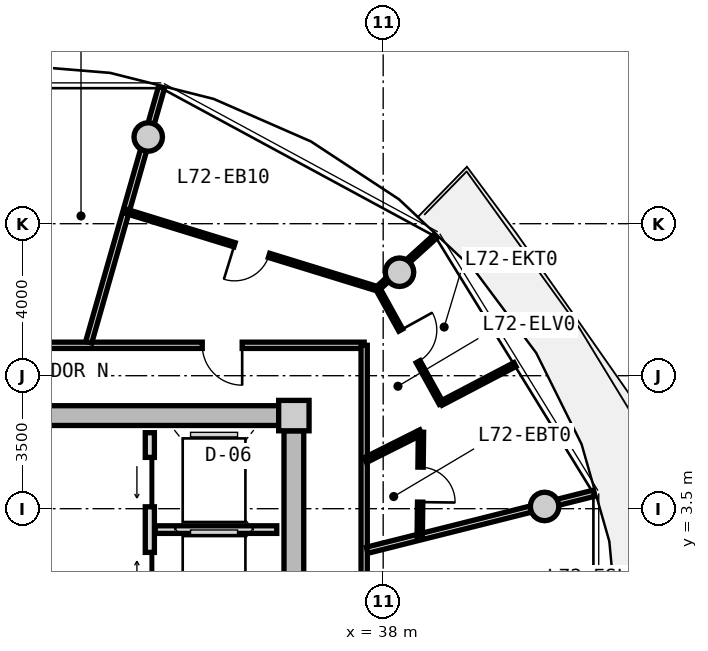
"""IFC4 building model, lengths in metres.
Left out: names, types, materials, properties, quantities, classifications, styles, units other than length and angle.
Written with IfcOpenShell. Run it as: python <this file> out.ifc"""

import sys

from ifc_helpers import new_model, si_unit, direction, frame, frame_2d, origin, origin_2d, place, context, subcontext, project, spatial, rectangle, circle, extrude, source, transform, mapped, element, fill, save


model = new_model("IFC4")
c1 = context("Model", 3, precision=1e-05, world=origin(), true_north=direction((0.0, 1.0)))
c2 = subcontext(c1, "Body", "Model", "MODEL_VIEW")
j1 = project(units=[si_unit("LENGTHUNIT", "METRE"), si_unit("PLANEANGLEUNIT", "RADIAN")], contexts=[c1])
p1 = place(None, origin())
s1 = spatial("IfcSite", under=j1, at=p1, CompositionType="ELEMENT")
p2 = place(p1, origin())
s2 = spatial("IfcBuilding", under=s1, at=p2, CompositionType="ELEMENT")
p3 = place(p2, frame((0.0, 0.0, 232.2)))
s3 = spatial("IfcBuildingStorey", under=s2, at=p3, CompositionType="ELEMENT", Elevation=232.2)
m1 = source(origin(), c2, "Body", "SweptSolid", [
    extrude(rectangle(XDim=0.8, YDim=0.8, at=origin_2d()), origin(), (0.0, 0.0, 1.0), 3.05),
])
p4 = place(p3, frame((35.65, 5.95, 0.0), z_axis=(0.0, 0.0, 1.0), x_axis=(1.0, 0.0, 0.0)))
e1 = element("IfcColumn", 1, at=p4, inside=s3, PredefinedType="COLUMN", context=c2, shape_type="MappedRepresentation", body=[
    mapped(m1, transform((0.0, 0.0, 0.0), x_axis=(1.0, 0.0, 0.0), y_axis=(0.0, 1.0, 0.0), z_axis=(0.0, 0.0, 1.0), scale=1.0)),
])
m2 = source(origin(), c2, "Body", "SweptSolid", [
    extrude(rectangle(XDim=14.5, YDim=0.52, at=frame_2d((7.25, 0.0))), origin(), (0.0, 0.0, 1.0), 2.81),
])
p5 = place(p3, frame((20.75, 5.95, 0.0), z_axis=(0.0, 0.0, 1.0), x_axis=(1.0, 0.0, 0.0)))
e2 = element("IfcWall", 2, at=p5, inside=s3, PredefinedType="SHEAR", context=c2, shape_type="MappedRepresentation", body=[
    mapped(m2, transform((0.0, 0.0, 0.0), x_axis=(1.0, 0.0, 0.0), y_axis=(0.0, 1.0, 0.0), z_axis=(0.0, 0.0, 1.0), scale=1.0)),
])
m3 = source(origin(), c2, "Body", "SweptSolid", [
    extrude(rectangle(XDim=11.1, YDim=0.52, at=frame_2d((5.55, 0.0))), origin(), (0.0, 0.0, 1.0), 2.81),
])
p6 = place(p3, frame((35.65, 5.55, 0.0), z_axis=(0.0, 0.0, 1.0), x_axis=(0.0, -1.0, 0.0)))
e3 = element("IfcWall", 3, at=p6, inside=s3, PredefinedType="SHEAR", context=c2, shape_type="MappedRepresentation", body=[
    mapped(m3, transform((0.0, 0.0, 0.0), x_axis=(1.0, 0.0, 0.0), y_axis=(0.0, 1.0, 0.0), z_axis=(0.0, 0.0, 1.0), scale=1.0)),
])
p7 = place(p6, frame((5.65, 0.0, 0.0)))
e4 = element("IfcOpeningElement", 4, at=p7, cuts=e3, PredefinedType="OPENING", context=c2, shape_type="SweptSolid", body=[
    extrude(rectangle(XDim=1.2, YDim=2.15, at=frame_2d((0.6, 1.075))), frame((0.0, 0.27, 0.0), z_axis=(0.0, -1.0, 0.0), x_axis=(1.0, 0.0, 0.0)), (0.0, 0.0, 1.0), 0.54),
])
m4 = source(origin(), c2, "Body", "SweptSolid", [
    extrude(circle(Radius=0.375, at=origin_2d()), origin(), (0.0, 0.0, 1.0), 3.05),
])
for number, where, z_axis, x_axis in (
    (5, (42.247, 3.559, 0.0), (0.0, 0.0, 1.0), (1.0, 0.0, 0.0)),
    (6, (38.43, 9.723, 0.0), (0.0, 0.0, 1.0), (1.0, 0.0, 0.0)),
    (7, (31.818, 13.281, 0.0), (0.0, 0.0, 1.0), (1.0, 0.0, 0.0)),
):
    element("IfcColumn", number, at=place(p3, frame(where, z_axis=z_axis, x_axis=x_axis)), inside=s3, PredefinedType="COLUMN", context=c2, shape_type="MappedRepresentation", body=[
        mapped(m4, transform((0.0, 0.0, 0.0), x_axis=(1.0, 0.0, 0.0), y_axis=(0.0, 1.0, 0.0), z_axis=(0.0, 0.0, 1.0), scale=1.0)),
    ])
m5 = source(origin(), c2, "Body", "SweptSolid", [
    extrude(rectangle(XDim=5.0, YDim=0.24, at=frame_2d((2.5, 0.0))), origin(), (0.0, 0.0, 1.0), 2.795),
])
p8 = place(p3, frame((31.86, 0.5, 0.0), z_axis=(0.0, 0.0, 1.0), x_axis=(0.0, 1.0, 0.0)))
e8 = element("IfcWall", 8, at=p8, inside=s3, PredefinedType="PARTITIONING", context=c2, shape_type="MappedRepresentation", body=[
    mapped(m5, transform((0.0, 0.0, 0.0), x_axis=(1.0, 0.0, 0.0), y_axis=(0.0, 1.0, 0.0), z_axis=(0.0, 0.0, 1.0), scale=1.0)),
])
p9 = place(p8, frame((3.05, 0.0, 0.0)))
e9 = element("IfcOpeningElement", 9, at=p9, cuts=e8, PredefinedType="OPENING", context=c2, shape_type="SweptSolid", body=[
    extrude(rectangle(XDim=1.3, YDim=2.2, at=frame_2d((0.65, 1.1))), frame((0.0, 0.13, 0.0), z_axis=(0.0, -1.0, 0.0), x_axis=(1.0, 0.0, 0.0)), (0.0, 0.0, 1.0), 0.26),
])
p10 = place(p8, frame((0.55, 0.0, 0.0)))
e10 = element("IfcOpeningElement", 10, at=p10, cuts=e8, PredefinedType="OPENING", context=c2, shape_type="SweptSolid", body=[
    extrude(rectangle(XDim=1.3, YDim=2.2, at=frame_2d((0.65, 1.1))), frame((0.0, 0.13, 0.0), z_axis=(0.0, -1.0, 0.0), x_axis=(1.0, 0.0, 0.0)), (0.0, 0.0, 1.0), 0.26),
])
m6 = source(origin(), c2, "Body", "SweptSolid", [
    extrude(rectangle(XDim=3.2, YDim=0.2, at=frame_2d((1.6, 0.0))), origin(), (0.0, 0.0, 1.0), 2.795),
])
p11 = place(p3, frame((32.0, 2.95, 0.0), z_axis=(0.0, 0.0, 1.0), x_axis=(1.0, 0.0, 0.0)))
e11 = element("IfcWall", 11, at=p11, inside=s3, PredefinedType="PARTITIONING", context=c2, shape_type="MappedRepresentation", body=[
    mapped(m6, transform((0.0, 0.0, 0.0), x_axis=(1.0, 0.0, 0.0), y_axis=(0.0, 1.0, 0.0), z_axis=(0.0, 0.0, 1.0), scale=1.0)),
])
m7 = source(origin(), c2, "Body", "SweptSolid", [
    extrude(rectangle(XDim=8.58, YDim=0.165, at=frame_2d((4.29, 0.0))), origin(), (0.0, 0.0, 1.0), 2.795),
])
p12 = place(p3, frame((28.92, 7.8, 0.0), z_axis=(0.0, 0.0, 1.0), x_axis=(1.0, 0.0, 0.0)))
e12 = element("IfcWall", 12, at=p12, inside=s3, PredefinedType="PARTITIONING", context=c2, shape_type="MappedRepresentation", body=[
    mapped(m7, transform((0.0, 0.0, 0.0), x_axis=(1.0, 0.0, 0.0), y_axis=(0.0, 1.0, 0.0), z_axis=(0.0, 0.0, 1.0), scale=1.0)),
])
p13 = place(p12, frame((4.32, 0.0, 0.0)))
e13 = element("IfcOpeningElement", 13, at=p13, cuts=e12, PredefinedType="OPENING", context=c2, shape_type="SweptSolid", body=[
    extrude(rectangle(XDim=1.05, YDim=2.15, at=frame_2d((0.525, 1.075))), frame((0.0, 0.093, 0.0), z_axis=(0.0, -1.0, 0.0), x_axis=(1.0, 0.0, 0.0)), (0.0, 0.0, 1.0), 0.185),
])
m8 = source(origin(), c2, "Body", "SweptSolid", [
    extrude(rectangle(XDim=6.88, YDim=0.165, at=frame_2d((3.44, 0.0))), origin(), (0.0, 0.0, 1.0), 2.795),
])
p14 = place(p3, frame((37.5, 7.8, 0.0), z_axis=(0.0, 0.0, 1.0), x_axis=(0.0, -1.0, 0.0)))
e14 = element("IfcWall", 14, at=p14, inside=s3, PredefinedType="PARTITIONING", context=c2, shape_type="MappedRepresentation", body=[
    mapped(m8, transform((0.0, 0.0, 0.0), x_axis=(1.0, 0.0, 0.0), y_axis=(0.0, 1.0, 0.0), z_axis=(0.0, 0.0, 1.0), scale=1.0)),
])
m9 = source(origin(), c2, "Body", "SweptSolid", [
    extrude(rectangle(XDim=6.974, YDim=0.165, at=frame_2d((3.487, 0.0))), origin(), (0.0, 0.0, 1.0), 2.395),
])
p15 = place(p3, frame((30.251, 7.88, 0.0), z_axis=(0.0, 0.0, 1.0), x_axis=(0.274707256801, 0.961527910703, 0.0)))
e15 = element("IfcWall", 15, at=p15, inside=s3, PredefinedType="PARTITIONING", context=c2, shape_type="MappedRepresentation", body=[
    mapped(m9, transform((0.0, 0.0, 0.0), x_axis=(1.0, 0.0, 0.0), y_axis=(0.0, 1.0, 0.0), z_axis=(0.0, 0.0, 1.0), scale=1.0)),
])
m10 = source(origin(), c2, "Body", "SweptSolid", [
    extrude(rectangle(XDim=6.157, YDim=0.165, at=frame_2d((3.079, 0.0))), origin(), (0.0, 0.0, 1.0), 2.395),
])
p16 = place(p3, frame((37.58, 2.407, 0.0), z_axis=(0.0, 0.0, 1.0), x_axis=(0.969840867184, 0.243738984038, 0.0)))
e16 = element("IfcWall", 16, at=p16, inside=s3, PredefinedType="PARTITIONING", context=c2, shape_type="MappedRepresentation", body=[
    mapped(m10, transform((0.0, 0.0, 0.0), x_axis=(1.0, 0.0, 0.0), y_axis=(0.0, 1.0, 0.0), z_axis=(0.0, 0.0, 1.0), scale=1.0)),
])
m11 = source(origin(), c2, "Body", "SweptSolid", [
    extrude(rectangle(XDim=6.919, YDim=0.115, at=frame_2d((3.459, 0.0))), origin(), (0.0, 0.0, 1.0), 2.795),
])
p17 = place(p3, frame((37.849, 9.287, 0.0), z_axis=(0.0, 0.0, 1.0), x_axis=(-0.955678249072, 0.294413118341, 0.0)))
e17 = element("IfcWall", 17, at=p17, inside=s3, PredefinedType="PARTITIONING", context=c2, shape_type="MappedRepresentation", body=[
    mapped(m11, transform((0.0, 0.0, 0.0), x_axis=(1.0, 0.0, 0.0), y_axis=(0.0, 1.0, 0.0), z_axis=(0.0, 0.0, 1.0), scale=1.0)),
])
p18 = place(p17, frame((2.985, 0.0, 0.0)))
e18 = element("IfcOpeningElement", 18, at=p18, cuts=e17, PredefinedType="OPENING", context=c2, shape_type="SweptSolid", body=[
    extrude(rectangle(XDim=0.95, YDim=2.1, at=frame_2d((0.475, 1.05))), frame((0.0, 0.067, 0.0), z_axis=(0.0, -1.0, 0.0), x_axis=(1.0, 0.0, 0.0)), (0.0, 0.0, 1.0), 0.135),
])
m12 = source(origin(), c2, "Body", "SweptSolid", [
    extrude(rectangle(XDim=2.072, YDim=0.115, at=frame_2d((1.036, 0.0))), origin(), (0.0, 0.0, 1.0), 2.395),
])
p19 = place(p3, frame((37.849, 9.287, 0.0), z_axis=(0.0, 0.0, 1.0), x_axis=(0.741410125356, 0.671052178314, 0.0)))
e19 = element("IfcWall", 19, at=p19, inside=s3, PredefinedType="PARTITIONING", context=c2, shape_type="MappedRepresentation", body=[
    mapped(m12, transform((0.0, 0.0, 0.0), x_axis=(1.0, 0.0, 0.0), y_axis=(0.0, 1.0, 0.0), z_axis=(0.0, 0.0, 1.0), scale=1.0)),
])
m13 = source(origin(), c2, "Body", "SweptSolid", [
    extrude(rectangle(XDim=1.638, YDim=0.14, at=frame_2d((0.819, 0.0))), origin(), (0.0, 0.0, 1.0), 2.795),
])
p20 = place(p3, frame((37.53, 4.778, 0.0), z_axis=(0.0, 0.0, 1.0), x_axis=(0.893919977945, 0.448226586707, 0.0)))
e20 = element("IfcWall", 20, at=p20, inside=s3, PredefinedType="PARTITIONING", context=c2, shape_type="MappedRepresentation", body=[
    mapped(m13, transform((0.0, 0.0, 0.0), x_axis=(1.0, 0.0, 0.0), y_axis=(0.0, 1.0, 0.0), z_axis=(0.0, 0.0, 1.0), scale=1.0)),
])
m14 = source(origin(), c2, "Body", "SweptSolid", [
    extrude(rectangle(XDim=2.759, YDim=0.14, at=frame_2d((1.379, 0.0))), origin(), (0.0, 0.0, 1.0), 2.795),
])
p21 = place(p3, frame((38.995, 5.513, 0.0), z_axis=(0.0, 0.0, 1.0), x_axis=(-0.01194710728, -0.999928630767, 0.0)))
e21 = element("IfcWall", 21, at=p21, inside=s3, PredefinedType="PARTITIONING", context=c2, shape_type="MappedRepresentation", body=[
    mapped(m14, transform((0.0, 0.0, 0.0), x_axis=(1.0, 0.0, 0.0), y_axis=(0.0, 1.0, 0.0), z_axis=(0.0, 0.0, 1.0), scale=1.0)),
])
p22 = place(p21, frame((0.919, 0.0, 0.0)))
e22 = element("IfcOpeningElement", 22, at=p22, cuts=e21, PredefinedType="OPENING", context=c2, shape_type="SweptSolid", body=[
    extrude(rectangle(XDim=0.92, YDim=2.1, at=frame_2d((0.46, 1.05))), frame((0.0, 0.08, 0.0), z_axis=(0.0, -1.0, 0.0), x_axis=(1.0, 0.0, 0.0)), (0.0, 0.0, 1.0), 0.16),
])
m15 = source(origin(), c2, "Body", "SweptSolid", [
    extrude(rectangle(XDim=2.193, YDim=0.115, at=frame_2d((1.097, 0.0))), origin(), (0.0, 0.0, 1.0), 2.795),
])
p23 = place(p3, frame((39.525, 6.275, 0.0), z_axis=(0.0, 0.0, 1.0), x_axis=(0.885783595046, 0.464098505435, 0.0)))
e23 = element("IfcWall", 23, at=p23, inside=s3, PredefinedType="PARTITIONING", context=c2, shape_type="MappedRepresentation", body=[
    mapped(m15, transform((0.0, 0.0, 0.0), x_axis=(1.0, 0.0, 0.0), y_axis=(0.0, 1.0, 0.0), z_axis=(0.0, 0.0, 1.0), scale=1.0)),
])
m16 = source(origin(), c2, "Body", "SweptSolid", [
    extrude(rectangle(XDim=3.45, YDim=0.115, at=frame_2d((1.725, 0.0))), origin(), (0.0, 0.0, 1.0), 2.795),
])
p24 = place(p3, frame((39.525, 6.275, 0.0), z_axis=(0.0, 0.0, 1.0), x_axis=(-0.483659007882, 0.875256513312, 0.0)))
e24 = element("IfcWall", 24, at=p24, inside=s3, PredefinedType="PARTITIONING", context=c2, shape_type="MappedRepresentation", body=[
    mapped(m16, transform((0.0, 0.0, 0.0), x_axis=(1.0, 0.0, 0.0), y_axis=(0.0, 1.0, 0.0), z_axis=(0.0, 0.0, 1.0), scale=1.0)),
])
p25 = place(p24, frame((1.25, 0.0, 0.0)))
e25 = element("IfcOpeningElement", 25, at=p25, cuts=e24, PredefinedType="OPENING", context=c2, shape_type="SweptSolid", body=[
    extrude(rectangle(XDim=0.95, YDim=2.1, at=frame_2d((0.475, 1.05))), frame((0.0, 0.067, 0.0), z_axis=(0.0, -1.0, 0.0), x_axis=(1.0, 0.0, 0.0)), (0.0, 0.0, 1.0), 0.135),
])
m17 = source(origin(), c2, "Body", "SweptSolid", [
    extrude(rectangle(XDim=1.3, YDim=2.2, at=frame_2d((0.65, 1.1))), frame((0.0, 0.025, 0.0), z_axis=(0.0, -1.0, 0.0), x_axis=(1.0, 0.0, 0.0)), (0.0, 0.0, 1.0), 0.05),
])
p26 = place(p9, origin())
e26 = element("IfcDoor", 26, at=p26, inside=s3, OperationType="SLIDING_TO_LEFT", PredefinedType="DOOR", context=c2, shape_type="MappedRepresentation", body=[
    mapped(m17, transform((0.0, 0.0, 0.0), x_axis=(1.0, 0.0, 0.0), y_axis=(0.0, 1.0, 0.0), z_axis=(0.0, 0.0, 1.0), scale=1.0)),
])
fill(e9, e26)
p27 = place(p10, origin())
e27 = element("IfcDoor", 27, at=p27, inside=s3, OperationType="SLIDING_TO_RIGHT", PredefinedType="DOOR", context=c2, shape_type="MappedRepresentation", body=[
    mapped(m17, transform((0.0, 0.0, 0.0), x_axis=(1.0, 0.0, 0.0), y_axis=(0.0, 1.0, 0.0), z_axis=(0.0, 0.0, 1.0), scale=1.0)),
])
fill(e10, e27)
m18 = source(origin(), c2, "Body", "SweptSolid", [
    extrude(rectangle(XDim=1.05, YDim=2.15, at=frame_2d((0.525, 1.075))), frame((0.0, 0.025, 0.0), z_axis=(0.0, -1.0, 0.0), x_axis=(1.0, 0.0, 0.0)), (0.0, 0.0, 1.0), 0.05),
])
p28 = place(p13, frame((1.05, 0.0, 0.0), z_axis=(0.0, 0.0, 1.0), x_axis=(-1.0, 0.0, 0.0)))
e28 = element("IfcDoor", 28, at=p28, inside=s3, OperationType="SINGLE_SWING_LEFT", PredefinedType="DOOR", context=c2, shape_type="MappedRepresentation", body=[
    mapped(m18, transform((0.0, 0.0, 0.0), x_axis=(1.0, 0.0, 0.0), y_axis=(0.0, 1.0, 0.0), z_axis=(0.0, 0.0, 1.0), scale=1.0)),
])
fill(e13, e28)
m19 = source(origin(), c2, "Body", "SweptSolid", [
    extrude(rectangle(XDim=0.92, YDim=2.1, at=frame_2d((0.46, 1.05))), frame((0.0, 0.025, 0.0), z_axis=(0.0, -1.0, 0.0), x_axis=(1.0, 0.0, 0.0)), (0.0, 0.0, 1.0), 0.05),
])
p29 = place(p22, origin())
e29 = element("IfcDoor", 29, at=p29, inside=s3, OperationType="SINGLE_SWING_RIGHT", PredefinedType="DOOR", context=c2, shape_type="MappedRepresentation", body=[
    mapped(m19, transform((0.0, 0.0, 0.0), x_axis=(1.0, 0.0, 0.0), y_axis=(0.0, 1.0, 0.0), z_axis=(0.0, 0.0, 1.0), scale=1.0)),
])
fill(e22, e29)
m20 = source(origin(), c2, "Body", "SweptSolid", [
    extrude(rectangle(XDim=0.95, YDim=2.1, at=frame_2d((0.475, 1.05))), frame((0.0, 0.025, 0.0), z_axis=(0.0, -1.0, 0.0), x_axis=(1.0, 0.0, 0.0)), (0.0, 0.0, 1.0), 0.05),
])
p30 = place(p25, frame((0.95, 0.0, 0.0), z_axis=(0.0, 0.0, 1.0), x_axis=(-1.0, 0.0, 0.0)))
e30 = element("IfcDoor", 30, at=p30, inside=s3, OperationType="SINGLE_SWING_LEFT", PredefinedType="DOOR", context=c2, shape_type="MappedRepresentation", body=[
    mapped(m20, transform((0.0, 0.0, 0.0), x_axis=(1.0, 0.0, 0.0), y_axis=(0.0, 1.0, 0.0), z_axis=(0.0, 0.0, 1.0), scale=1.0)),
])
fill(e25, e30)
p31 = place(p18, origin())
e31 = element("IfcDoor", 31, at=p31, inside=s3, OperationType="SINGLE_SWING_RIGHT", PredefinedType="DOOR", context=c2, shape_type="MappedRepresentation", body=[
    mapped(m20, transform((0.0, 0.0, 0.0), x_axis=(1.0, 0.0, 0.0), y_axis=(0.0, 1.0, 0.0), z_axis=(0.0, 0.0, 1.0), scale=1.0)),
])
fill(e18, e31)
save(model, sys.argv[1])
